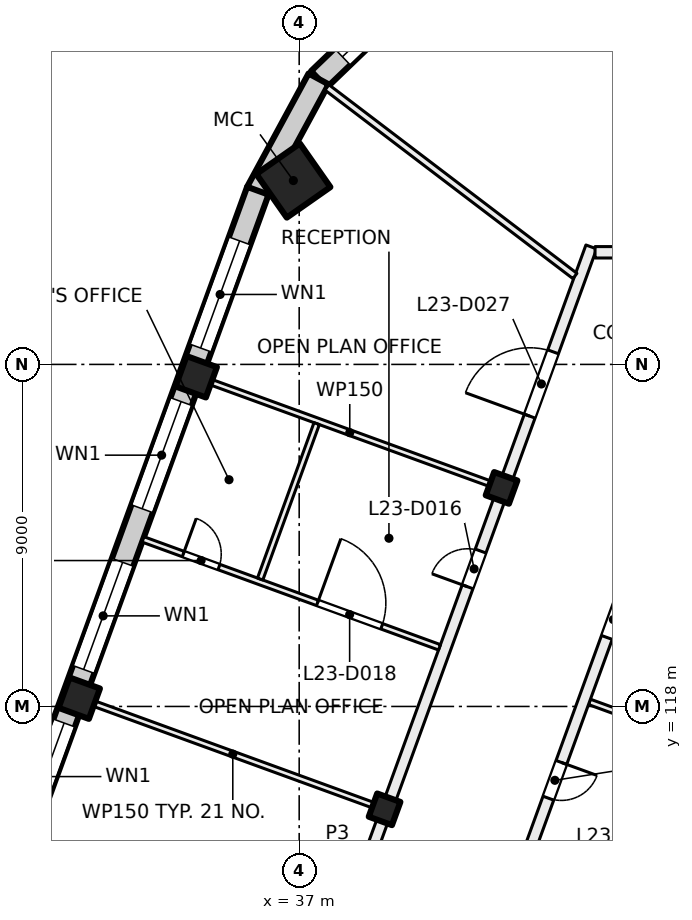
"""IFC4 building model, lengths in metres.
Left out: names, types, materials, properties, quantities, classifications, styles, units other than length and angle.
Written with IfcOpenShell. Run it as: python <this file> out.ifc"""

import sys

from ifc_helpers import new_model, si_unit, direction, frame, frame_2d, origin, origin_2d, place, context, subcontext, project, spatial, rectangle, hollow_rectangle, extrude, element, fill, save


model = new_model("IFC4")
c1 = context("Model", 3, precision=1e-05, world=origin(), true_north=direction((0.0, 1.0)))
c2 = subcontext(c1, "Body", "Model", "MODEL_VIEW")
j1 = project(units=[si_unit("LENGTHUNIT", "METRE"), si_unit("PLANEANGLEUNIT", "RADIAN")], contexts=[c1])
p1 = place(None, origin())
s1 = spatial("IfcSite", under=j1, at=p1, CompositionType="ELEMENT")
p2 = place(p1, origin())
s2 = spatial("IfcBuilding", under=s1, at=p2, CompositionType="ELEMENT")
p3 = place(p2, frame((0.0, 0.0, 101.0)))
s3 = spatial("IfcBuildingStorey", under=s2, at=p3, CompositionType="ELEMENT", Elevation=101.0)
p4 = place(p3, frame((36.846, 131.838, 0.0), z_axis=(0.0, 0.0, 1.0), x_axis=(0.573576436351, -0.819152044289, 0.0)))
e1 = element("IfcColumn", 1, at=p4, inside=s3, PredefinedType="COLUMN", context=c2, shape_type="SweptSolid", body=[
    extrude(hollow_rectangle(XDim=1.4, YDim=1.4, WallThickness=0.04, at=origin_2d()), origin(), (0.0, 0.0, 1.0), 4.0),
])
for number, where, z_axis, x_axis in (
    (2, (42.325, 123.751, 0.0), (0.0, 0.0, 1.0), (-0.342, -0.94, 0.0)),
    (3, (39.247, 115.293, 0.0), (0.0, 0.0, 1.0), (-0.342, -0.94, 0.0)),
):
    element("IfcColumn", number, at=place(p3, frame(where, z_axis=z_axis, x_axis=x_axis)), inside=s3, PredefinedType="COLUMN", context=c2, shape_type="SweptSolid", body=[
        extrude(rectangle(XDim=0.65, YDim=0.65, at=origin_2d()), origin(), (0.0, 0.0, 1.0), 4.0),
    ])
for number, where, z_axis, x_axis in (
    (4, (34.291, 126.675, 0.0), (0.0, 0.0, 1.0), (-0.342, -0.94, 0.0)),
    (5, (31.212, 118.218, 0.0), (0.0, 0.0, 1.0), (-0.342, -0.94, 0.0)),
):
    element("IfcColumn", number, at=place(p3, frame(where, z_axis=z_axis, x_axis=x_axis)), inside=s3, PredefinedType="COLUMN", context=c2, shape_type="SweptSolid", body=[
        extrude(rectangle(XDim=0.85, YDim=0.85, at=origin_2d()), origin(), (0.0, 0.0, 1.0), 4.0),
    ])
p5 = place(p3, frame((37.52, 134.501, 0.0), z_axis=(0.0, 0.0, 1.0), x_axis=(0.72115684486, 0.692771827596, 0.0)))
e6 = element("IfcWall", 6, at=p5, inside=s3, PredefinedType="SOLIDWALL", context=c2, shape_type="SweptSolid", body=[
    extrude(rectangle(XDim=3.303, YDim=0.6, at=frame_2d((1.651, 0.0))), origin(), (0.0, 0.0, 1.0), 3.625),
])
p6 = place(p5, frame((0.856, 0.0, 0.9)))
e7 = element("IfcOpeningElement", 7, at=p6, cuts=e6, PredefinedType="OPENING", context=c2, shape_type="SweptSolid", body=[
    extrude(rectangle(XDim=1.5, YDim=2.4, at=frame_2d((0.75, 1.2))), frame((0.0, 0.31, 0.0), z_axis=(0.0, -1.0, 0.0), x_axis=(1.0, 0.0, 0.0)), (0.0, 0.0, 1.0), 0.62),
])
p7 = place(p3, frame((35.895, 131.53, 0.0), z_axis=(0.0, 0.0, 1.0), x_axis=(0.476531180538, 0.879157570618, 0.0)))
e8 = element("IfcWall", 8, at=p7, inside=s3, PredefinedType="SOLIDWALL", context=c2, shape_type="SweptSolid", body=[
    extrude(rectangle(XDim=3.393, YDim=0.6, at=frame_2d((1.696, 0.0))), origin(), (0.0, 0.0, 1.0), 3.625),
])
p8 = place(p3, frame((24.666, 100.669, 0.0), z_axis=(0.0, 0.0, 1.0), x_axis=(0.34201964167, 0.939692803373, 0.0)))
e9 = element("IfcWall", 9, at=p8, inside=s3, PredefinedType="SOLIDWALL", context=c2, shape_type="SweptSolid", body=[
    extrude(rectangle(XDim=32.884, YDim=0.6, at=frame_2d((16.442, 0.0))), origin(), (0.0, 0.0, 1.0), 3.625),
])
p9 = place(p8, frame((1.48, 0.0, 0.9)))
e10 = element("IfcOpeningElement", 10, at=p9, cuts=e9, PredefinedType="OPENING", context=c2, shape_type="SweptSolid", body=[
    extrude(rectangle(XDim=3.0, YDim=2.4, at=frame_2d((1.5, 1.2))), frame((0.0, 0.31, 0.0), z_axis=(0.0, -1.0, 0.0), x_axis=(1.0, 0.0, 0.0)), (0.0, 0.0, 1.0), 0.62),
])
p10 = place(p8, frame((5.98, 0.0, 0.9)))
e11 = element("IfcOpeningElement", 11, at=p10, cuts=e9, PredefinedType="OPENING", context=c2, shape_type="SweptSolid", body=[
    extrude(rectangle(XDim=3.0, YDim=2.4, at=frame_2d((1.5, 1.2))), frame((0.0, 0.31, 0.0), z_axis=(0.0, -1.0, 0.0), x_axis=(1.0, 0.0, 0.0)), (0.0, 0.0, 1.0), 0.62),
])
p11 = place(p8, frame((10.48, 0.0, 0.9)))
e12 = element("IfcOpeningElement", 12, at=p11, cuts=e9, PredefinedType="OPENING", context=c2, shape_type="SweptSolid", body=[
    extrude(rectangle(XDim=3.0, YDim=2.4, at=frame_2d((1.5, 1.2))), frame((0.0, 0.31, 0.0), z_axis=(0.0, -1.0, 0.0), x_axis=(1.0, 0.0, 0.0)), (0.0, 0.0, 1.0), 0.62),
])
p12 = place(p8, frame((14.98, 0.0, 0.9)))
e13 = element("IfcOpeningElement", 13, at=p12, cuts=e9, PredefinedType="OPENING", context=c2, shape_type="SweptSolid", body=[
    extrude(rectangle(XDim=3.0, YDim=2.4, at=frame_2d((1.5, 1.2))), frame((0.0, 0.31, 0.0), z_axis=(0.0, -1.0, 0.0), x_axis=(1.0, 0.0, 0.0)), (0.0, 0.0, 1.0), 0.62),
])
p13 = place(p8, frame((19.48, 0.0, 0.9)))
e14 = element("IfcOpeningElement", 14, at=p13, cuts=e9, PredefinedType="OPENING", context=c2, shape_type="SweptSolid", body=[
    extrude(rectangle(XDim=3.0, YDim=2.4, at=frame_2d((1.5, 1.2))), frame((0.0, 0.31, 0.0), z_axis=(0.0, -1.0, 0.0), x_axis=(1.0, 0.0, 0.0)), (0.0, 0.0, 1.0), 0.62),
])
p14 = place(p8, frame((23.98, 0.0, 0.9)))
e15 = element("IfcOpeningElement", 15, at=p14, cuts=e9, PredefinedType="OPENING", context=c2, shape_type="SweptSolid", body=[
    extrude(rectangle(XDim=3.0, YDim=2.4, at=frame_2d((1.5, 1.2))), frame((0.0, 0.31, 0.0), z_axis=(0.0, -1.0, 0.0), x_axis=(1.0, 0.0, 0.0)), (0.0, 0.0, 1.0), 0.62),
])
p15 = place(p8, frame((28.48, 0.0, 0.9)))
e16 = element("IfcOpeningElement", 16, at=p15, cuts=e9, PredefinedType="OPENING", context=c2, shape_type="SweptSolid", body=[
    extrude(rectangle(XDim=3.0, YDim=2.4, at=frame_2d((1.5, 1.2))), frame((0.0, 0.31, 0.0), z_axis=(0.0, -1.0, 0.0), x_axis=(1.0, 0.0, 0.0)), (0.0, 0.0, 1.0), 0.62),
])
p16 = place(p3, frame((31.353, 118.166, 0.0), z_axis=(0.0, 0.0, 1.0), x_axis=(0.939687752599, -0.342033518263, 0.0)))
e17 = element("IfcWall", 17, at=p16, inside=s3, PredefinedType="PARTITIONING", context=c2, shape_type="SweptSolid", body=[
    extrude(rectangle(XDim=8.301, YDim=0.15, at=frame_2d((4.15, 0.0))), origin(), (0.0, 0.0, 1.0), 3.625),
])
p17 = place(p3, frame((32.881, 97.657, 0.0), z_axis=(0.0, 0.0, 1.0), x_axis=(0.342017360004, 0.939693633828, 0.0)))
e18 = element("IfcWall", 18, at=p17, inside=s3, PredefinedType="PARTITIONING", context=c2, shape_type="SweptSolid", body=[
    extrude(rectangle(XDim=34.516, YDim=0.3, at=frame_2d((17.258, 0.0))), origin(), (0.0, 0.0, 1.0), 3.625),
])
p18 = place(p17, frame((7.475, 0.0, 0.0)))
e19 = element("IfcOpeningElement", 19, at=p18, cuts=e18, PredefinedType="OPENING", context=c2, shape_type="SweptSolid", body=[
    extrude(rectangle(XDim=1.8, YDim=2.1, at=frame_2d((0.9, 1.05))), frame((0.0, 0.16, 0.0), z_axis=(0.0, -1.0, 0.0), x_axis=(1.0, 0.0, 0.0)), (0.0, 0.0, 1.0), 0.32),
])
p19 = place(p17, frame((25.0, 0.0, 0.0)))
e20 = element("IfcOpeningElement", 20, at=p19, cuts=e18, PredefinedType="OPENING", context=c2, shape_type="SweptSolid", body=[
    extrude(rectangle(XDim=1.0, YDim=2.1, at=frame_2d((0.5, 1.05))), frame((0.0, 0.16, 0.0), z_axis=(0.0, -1.0, 0.0), x_axis=(1.0, 0.0, 0.0)), (0.0, 0.0, 1.0), 0.32),
])
p20 = place(p17, frame((29.779, 0.0, 0.0)))
e21 = element("IfcOpeningElement", 21, at=p20, cuts=e18, PredefinedType="OPENING", context=c2, shape_type="SweptSolid", body=[
    extrude(rectangle(XDim=1.8, YDim=2.1, at=frame_2d((0.9, 1.05))), frame((0.0, 0.16, 0.0), z_axis=(0.0, -1.0, 0.0), x_axis=(1.0, 0.0, 0.0)), (0.0, 0.0, 1.0), 0.32),
])
p21 = place(p3, frame((32.892, 122.395, 0.0), z_axis=(0.0, 0.0, 1.0), x_axis=(0.939684311623, -0.3420429717, 0.0)))
e22 = element("IfcWall", 22, at=p21, inside=s3, PredefinedType="PARTITIONING", context=c2, shape_type="SweptSolid", body=[
    extrude(rectangle(XDim=8.301, YDim=0.15, at=frame_2d((4.15, 0.0))), origin(), (0.0, 0.0, 1.0), 3.625),
])
p22 = place(p21, frame((1.125, 0.0, 0.0)))
e23 = element("IfcOpeningElement", 23, at=p22, cuts=e22, PredefinedType="OPENING", context=c2, shape_type="SweptSolid", body=[
    extrude(rectangle(XDim=1.0, YDim=2.1, at=frame_2d((0.5, 1.05))), frame((0.0, 0.085, 0.0), z_axis=(0.0, -1.0, 0.0), x_axis=(1.0, 0.0, 0.0)), (0.0, 0.0, 1.0), 0.17),
])
p23 = place(p21, frame((4.884, 0.0, 0.0)))
e24 = element("IfcOpeningElement", 24, at=p23, cuts=e22, PredefinedType="OPENING", context=c2, shape_type="SweptSolid", body=[
    extrude(rectangle(XDim=1.8, YDim=2.1, at=frame_2d((0.9, 1.05))), frame((0.0, 0.085, 0.0), z_axis=(0.0, -1.0, 0.0), x_axis=(1.0, 0.0, 0.0)), (0.0, 0.0, 1.0), 0.17),
])
p24 = place(p3, frame((34.431, 126.624, 0.0), z_axis=(0.0, 0.0, 1.0), x_axis=(0.939687752599, -0.342033518263, 0.0)))
e25 = element("IfcWall", 25, at=p24, inside=s3, PredefinedType="PARTITIONING", context=c2, shape_type="SweptSolid", body=[
    extrude(rectangle(XDim=8.301, YDim=0.15, at=frame_2d((4.15, 0.0))), origin(), (0.0, 0.0, 1.0), 3.625),
])
p25 = place(p3, frame((37.46, 125.442, 0.0), z_axis=(0.0, 0.0, 1.0), x_axis=(-0.341783611499, -0.939778677621, 0.0)))
e26 = element("IfcWall", 26, at=p25, inside=s3, PredefinedType="PARTITIONING", context=c2, shape_type="SweptSolid", body=[
    extrude(rectangle(XDim=4.351, YDim=0.15, at=frame_2d((2.175, 0.0))), origin(), (0.0, 0.0, 1.0), 3.625),
])
p26 = place(p3, frame((44.256, 129.327, 0.0), z_axis=(0.0, 0.0, 1.0), x_axis=(-0.796040504107, 0.605243352563, 0.0)))
e27 = element("IfcWall", 27, at=p26, inside=s3, PredefinedType="PARTITIONING", context=c2, shape_type="SweptSolid", body=[
    extrude(rectangle(XDim=8.197, YDim=0.175, at=frame_2d((4.099, 0.0))), origin(), (0.0, 0.0, 1.0), 3.625),
])
p27 = place(p3, frame((44.639, 118.12, 0.0), z_axis=(0.0, 0.0, 1.0), x_axis=(0.939669707102, -0.342083091593, 0.0)))
e28 = element("IfcWall", 28, at=p27, inside=s3, PredefinedType="PARTITIONING", context=c2, shape_type="SweptSolid", body=[
    extrude(rectangle(XDim=8.589, YDim=0.15, at=frame_2d((4.295, 0.0))), origin(), (0.0, 0.0, 1.0), 3.625),
])
p28 = place(p3, frame((44.785, 129.95, 0.0), z_axis=(0.0, 0.0, 1.0), x_axis=(1.0, 0.0, 0.0)))
e29 = element("IfcWall", 29, at=p28, inside=s3, PredefinedType="PARTITIONING", context=c2, shape_type="SweptSolid", body=[
    extrude(rectangle(XDim=19.115, YDim=0.3, at=frame_2d((9.558, 0.0))), origin(), (0.0, 0.0, 1.0), 3.625),
])
p29 = place(p28, frame((15.615, 0.0, 0.0)))
e30 = element("IfcOpeningElement", 30, at=p29, cuts=e29, PredefinedType="OPENING", context=c2, shape_type="SweptSolid", body=[
    extrude(rectangle(XDim=1.2, YDim=2.1, at=frame_2d((0.6, 1.05))), frame((0.0, 0.16, 0.0), z_axis=(0.0, -1.0, 0.0), x_axis=(1.0, 0.0, 0.0)), (0.0, 0.0, 1.0), 0.32),
])
p30 = place(p28, frame((11.115, 0.0, 0.0)))
e31 = element("IfcOpeningElement", 31, at=p30, cuts=e29, PredefinedType="OPENING", context=c2, shape_type="SweptSolid", body=[
    extrude(rectangle(XDim=1.2, YDim=2.1, at=frame_2d((0.6, 1.05))), frame((0.0, 0.16, 0.0), z_axis=(0.0, -1.0, 0.0), x_axis=(1.0, 0.0, 0.0)), (0.0, 0.0, 1.0), 0.32),
])
p31 = place(p28, frame((4.123, 0.0, 0.0)))
e32 = element("IfcOpeningElement", 32, at=p31, cuts=e29, PredefinedType="OPENING", context=c2, shape_type="SweptSolid", body=[
    extrude(rectangle(XDim=1.2, YDim=2.1, at=frame_2d((0.6, 1.05))), frame((0.0, 0.16, 0.0), z_axis=(0.0, -1.0, 0.0), x_axis=(1.0, 0.0, 0.0)), (0.0, 0.0, 1.0), 0.32),
])
p32 = place(p3, frame((47.314, 125.909, 0.0), z_axis=(0.0, 0.0, 1.0), x_axis=(-0.342010770371, -0.939696032209, 0.0)))
e33 = element("IfcWall", 33, at=p32, inside=s3, PredefinedType="PARTITIONING", context=c2, shape_type="SweptSolid", body=[
    extrude(rectangle(XDim=31.485, YDim=0.3, at=frame_2d((15.742, 0.0))), origin(), (0.0, 0.0, 1.0), 3.625),
])
p33 = place(p32, frame((26.11, 0.0, 0.0)))
e34 = element("IfcOpeningElement", 34, at=p33, cuts=e33, PredefinedType="OPENING", context=c2, shape_type="SweptSolid", body=[
    extrude(rectangle(XDim=1.0, YDim=2.1, at=frame_2d((0.5, 1.05))), frame((0.0, 0.16, 0.0), z_axis=(0.0, -1.0, 0.0), x_axis=(1.0, 0.0, 0.0)), (0.0, 0.0, 1.0), 0.32),
])
p34 = place(p32, frame((15.485, 0.0, 0.0)))
e35 = element("IfcOpeningElement", 35, at=p34, cuts=e33, PredefinedType="OPENING", context=c2, shape_type="SweptSolid", body=[
    extrude(rectangle(XDim=1.0, YDim=2.1, at=frame_2d((0.5, 1.05))), frame((0.0, 0.16, 0.0), z_axis=(0.0, -1.0, 0.0), x_axis=(1.0, 0.0, 0.0)), (0.0, 0.0, 1.0), 0.32),
])
p35 = place(p32, frame((9.985, 0.0, 0.0)))
e36 = element("IfcOpeningElement", 36, at=p35, cuts=e33, PredefinedType="OPENING", context=c2, shape_type="SweptSolid", body=[
    extrude(rectangle(XDim=1.0, YDim=2.1, at=frame_2d((0.5, 1.05))), frame((0.0, 0.16, 0.0), z_axis=(0.0, -1.0, 0.0), x_axis=(1.0, 0.0, 0.0)), (0.0, 0.0, 1.0), 0.32),
])
p36 = place(p32, frame((5.484, 0.0, 0.0)))
e37 = element("IfcOpeningElement", 37, at=p36, cuts=e33, PredefinedType="OPENING", context=c2, shape_type="SweptSolid", body=[
    extrude(rectangle(XDim=1.0, YDim=2.1, at=frame_2d((0.5, 1.05))), frame((0.0, 0.16, 0.0), z_axis=(0.0, -1.0, 0.0), x_axis=(1.0, 0.0, 0.0)), (0.0, 0.0, 1.0), 0.32),
])
p37 = place(p6, origin())
e38 = element("IfcWindow", 38, at=p37, inside=s3, PartitioningType="SINGLE_PANEL", PredefinedType="WINDOW", context=c2, shape_type="SweptSolid", body=[
    extrude(rectangle(XDim=1.5, YDim=2.4, at=frame_2d((0.75, 1.2))), frame((0.0, 0.03, 0.0), z_axis=(0.0, -1.0, 0.0), x_axis=(1.0, 0.0, 0.0)), (0.0, 0.0, 1.0), 0.06),
])
fill(e7, e38)
p38 = place(p12, origin())
e39 = element("IfcWindow", 39, at=p38, inside=s3, PartitioningType="SINGLE_PANEL", PredefinedType="WINDOW", context=c2, shape_type="SweptSolid", body=[
    extrude(rectangle(XDim=3.0, YDim=2.4, at=frame_2d((1.5, 1.2))), frame((0.0, 0.03, 0.0), z_axis=(0.0, -1.0, 0.0), x_axis=(1.0, 0.0, 0.0)), (0.0, 0.0, 1.0), 0.06),
])
fill(e13, e39)
p39 = place(p13, origin())
e40 = element("IfcWindow", 40, at=p39, inside=s3, PartitioningType="SINGLE_PANEL", PredefinedType="WINDOW", context=c2, shape_type="SweptSolid", body=[
    extrude(rectangle(XDim=3.0, YDim=2.4, at=frame_2d((1.5, 1.2))), frame((0.0, 0.03, 0.0), z_axis=(0.0, -1.0, 0.0), x_axis=(1.0, 0.0, 0.0)), (0.0, 0.0, 1.0), 0.06),
])
fill(e14, e40)
p40 = place(p14, origin())
e41 = element("IfcWindow", 41, at=p40, inside=s3, PartitioningType="SINGLE_PANEL", PredefinedType="WINDOW", context=c2, shape_type="SweptSolid", body=[
    extrude(rectangle(XDim=3.0, YDim=2.4, at=frame_2d((1.5, 1.2))), frame((0.0, 0.03, 0.0), z_axis=(0.0, -1.0, 0.0), x_axis=(1.0, 0.0, 0.0)), (0.0, 0.0, 1.0), 0.06),
])
fill(e15, e41)
p41 = place(p15, origin())
e42 = element("IfcWindow", 42, at=p41, inside=s3, PartitioningType="SINGLE_PANEL", PredefinedType="WINDOW", context=c2, shape_type="SweptSolid", body=[
    extrude(rectangle(XDim=3.0, YDim=2.4, at=frame_2d((1.5, 1.2))), frame((0.0, 0.03, 0.0), z_axis=(0.0, -1.0, 0.0), x_axis=(1.0, 0.0, 0.0)), (0.0, 0.0, 1.0), 0.06),
])
fill(e16, e42)
p42 = place(p19, origin())
e43 = element("IfcDoor", 43, at=p42, inside=s3, OperationType="SINGLE_SWING_LEFT", PredefinedType="DOOR", context=c2, shape_type="SweptSolid", body=[
    extrude(rectangle(XDim=1.0, YDim=2.1, at=frame_2d((0.5, 1.05))), frame((0.0, 0.025, 0.0), z_axis=(0.0, -1.0, 0.0), x_axis=(1.0, 0.0, 0.0)), (0.0, 0.0, 1.0), 0.05),
])
fill(e20, e43)
p43 = place(p22, origin())
e44 = element("IfcDoor", 44, at=p43, inside=s3, OperationType="SINGLE_SWING_RIGHT", PredefinedType="DOOR", context=c2, shape_type="SweptSolid", body=[
    extrude(rectangle(XDim=1.0, YDim=2.1, at=frame_2d((0.5, 1.05))), frame((0.0, 0.025, 0.0), z_axis=(0.0, -1.0, 0.0), x_axis=(1.0, 0.0, 0.0)), (0.0, 0.0, 1.0), 0.05),
])
fill(e23, e44)
p44 = place(p23, origin())
e45 = element("IfcDoor", 45, at=p44, inside=s3, OperationType="DOUBLE_DOOR_SINGLE_SWING", PredefinedType="DOOR", context=c2, shape_type="SweptSolid", body=[
    extrude(rectangle(XDim=1.8, YDim=2.1, at=frame_2d((0.9, 1.05))), frame((0.0, 0.025, 0.0), z_axis=(0.0, -1.0, 0.0), x_axis=(1.0, 0.0, 0.0)), (0.0, 0.0, 1.0), 0.05),
])
fill(e24, e45)
p45 = place(p35, origin())
e46 = element("IfcDoor", 46, at=p45, inside=s3, OperationType="SINGLE_SWING_LEFT", PredefinedType="DOOR", context=c2, shape_type="SweptSolid", body=[
    extrude(rectangle(XDim=1.0, YDim=2.1, at=frame_2d((0.5, 1.05))), frame((0.0, 0.025, 0.0), z_axis=(0.0, -1.0, 0.0), x_axis=(1.0, 0.0, 0.0)), (0.0, 0.0, 1.0), 0.05),
])
fill(e36, e46)
p46 = place(p36, origin())
e47 = element("IfcDoor", 47, at=p46, inside=s3, OperationType="SINGLE_SWING_LEFT", PredefinedType="DOOR", context=c2, shape_type="SweptSolid", body=[
    extrude(rectangle(XDim=1.0, YDim=2.1, at=frame_2d((0.5, 1.05))), frame((0.0, 0.025, 0.0), z_axis=(0.0, -1.0, 0.0), x_axis=(1.0, 0.0, 0.0)), (0.0, 0.0, 1.0), 0.05),
])
fill(e37, e47)
p47 = place(p20, origin())
e48 = element("IfcDoor", 48, at=p47, inside=s3, OperationType="DOUBLE_DOOR_SINGLE_SWING", PredefinedType="DOOR", context=c2, shape_type="SweptSolid", body=[
    extrude(rectangle(XDim=1.8, YDim=2.1, at=frame_2d((0.9, 1.05))), frame((0.0, 0.025, 0.0), z_axis=(0.0, -1.0, 0.0), x_axis=(1.0, 0.0, 0.0)), (0.0, 0.0, 1.0), 0.05),
])
fill(e21, e48)
save(model, sys.argv[1])
